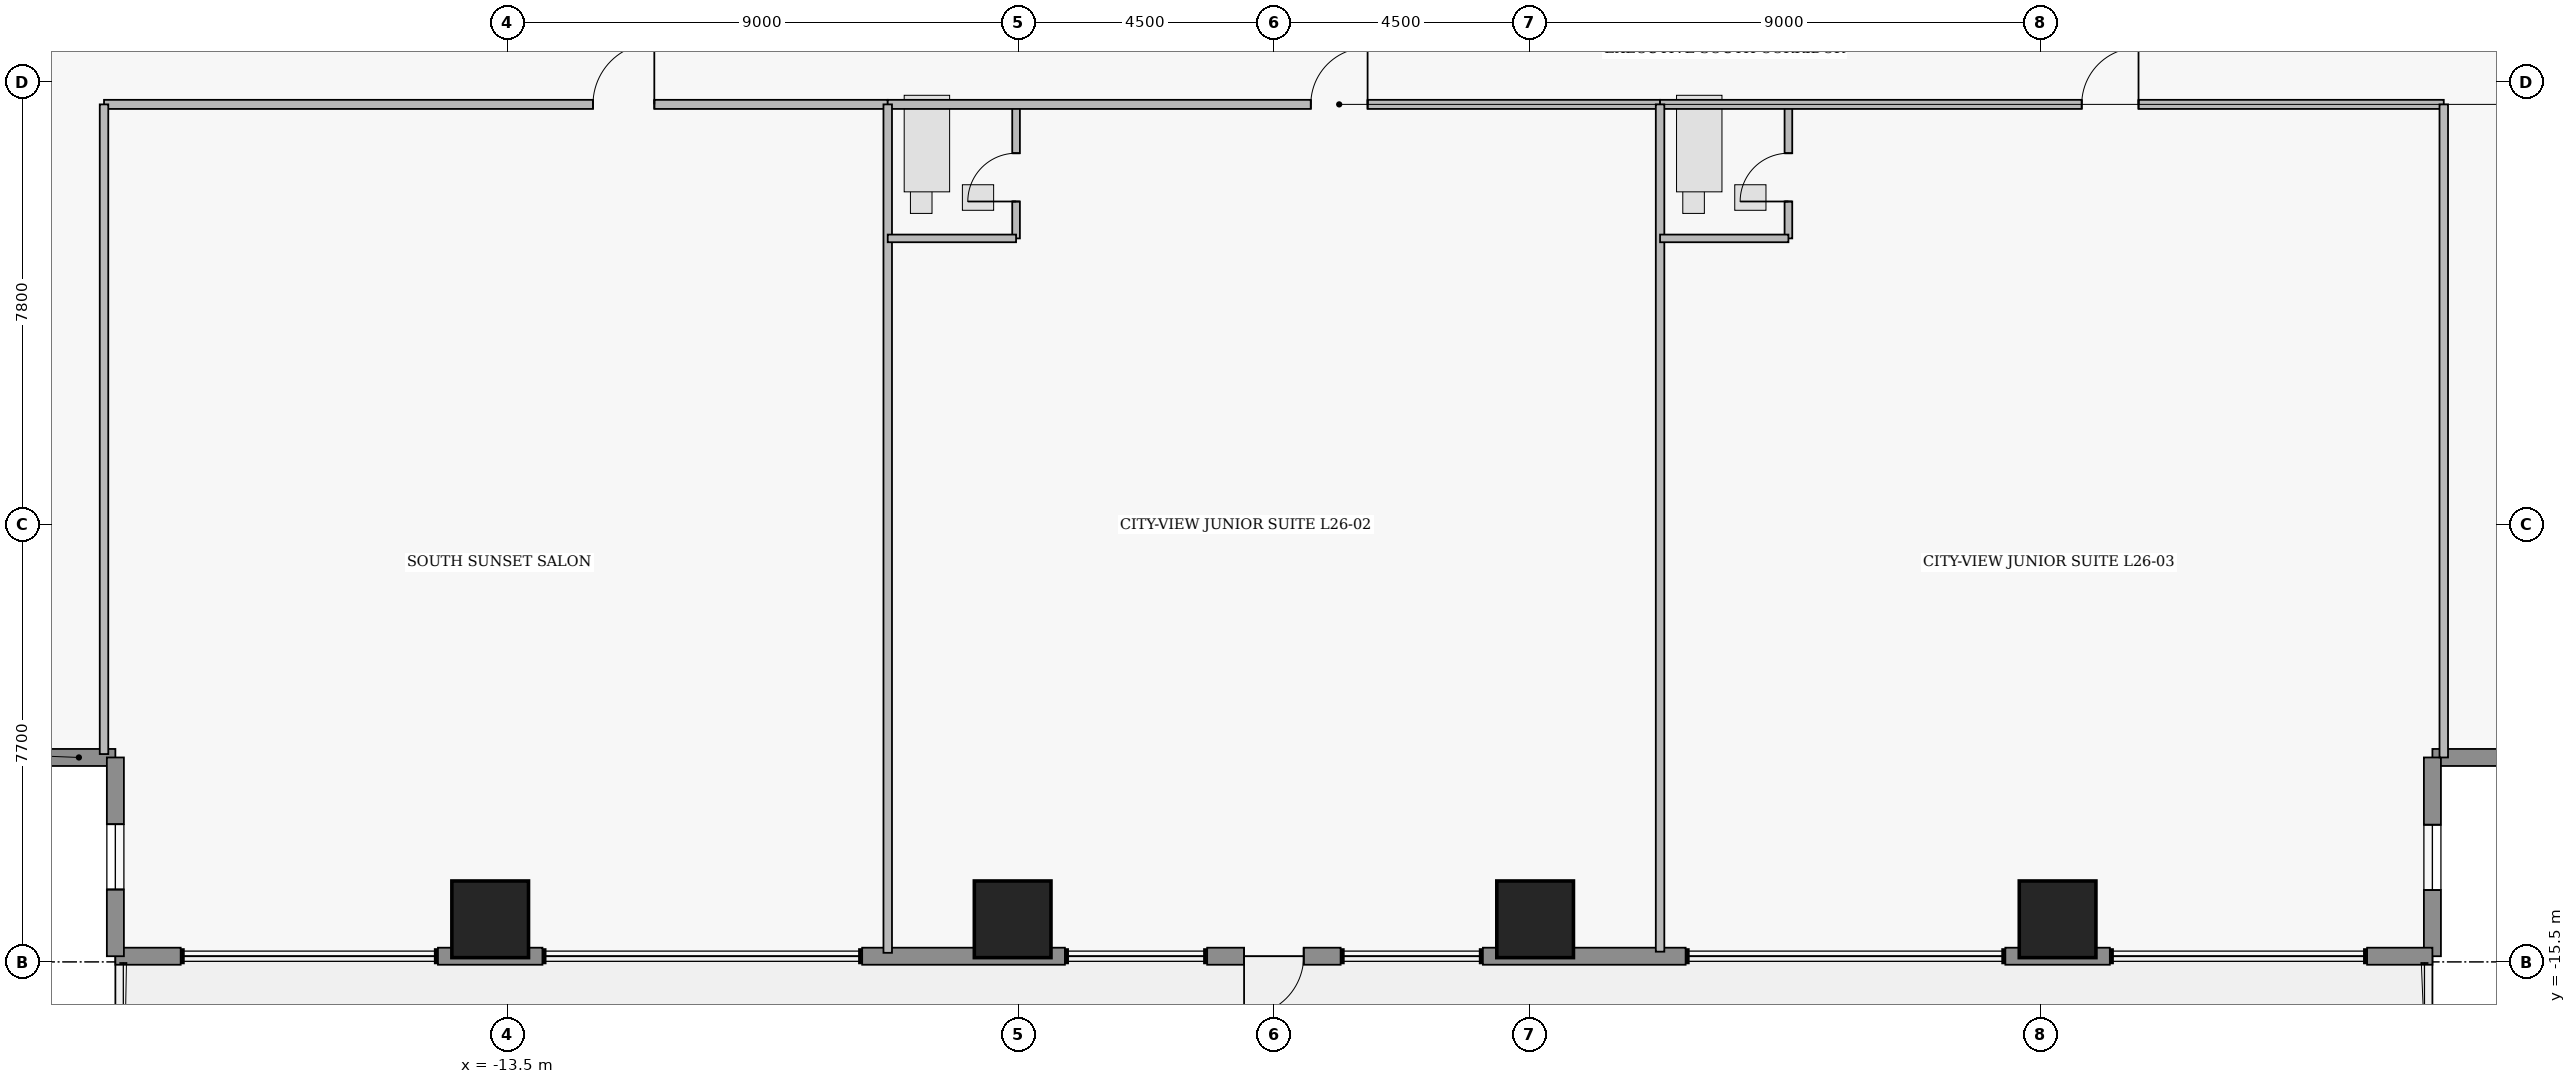
"""IFC4 building model, lengths in metres.
Left out: names, types, materials, properties, quantities, classifications, styles, units other than length and angle.
Written with IfcOpenShell. Run it as: python <this file> out.ifc"""

import sys

from ifc_helpers import new_model, si_unit, direction, frame, frame_2d, origin, origin_2d, place, context, subcontext, project, spatial, rectangle, extrude, element, fill, save


model = new_model("IFC4")
c1 = context("Model", 3, precision=1e-05, world=origin(), true_north=direction((0.0, 1.0)))
c2 = subcontext(c1, "Body", "Model", "MODEL_VIEW")
j1 = project(units=[si_unit("LENGTHUNIT", "METRE"), si_unit("PLANEANGLEUNIT", "RADIAN")], contexts=[c1])
p1 = place(None, origin())
s1 = spatial("IfcSite", under=j1, at=p1, CompositionType="ELEMENT")
p2 = place(p1, origin())
s2 = spatial("IfcBuilding", under=s1, at=p2, CompositionType="ELEMENT")
p3 = place(p2, frame((0.0, 0.0, 106.6)))
s3 = spatial("IfcBuildingStorey", under=s2, at=p3, CompositionType="ELEMENT", Elevation=106.6)
for number, where, z_axis, x_axis in (
    (1, (-13.8, -14.75, 0.0), (0.0, 0.0, 1.0), (1.0, 0.0, 0.0)),
    (2, (-4.6, -14.75, 0.0), (0.0, 0.0, 1.0), (1.0, 0.0, 0.0)),
    (3, (4.6, -14.75, 0.0), (0.0, 0.0, 1.0), (1.0, 0.0, 0.0)),
    (4, (13.8, -14.75, 0.0), (0.0, 0.0, 1.0), (1.0, 0.0, 0.0)),
):
    element("IfcColumn", number, at=place(p3, frame(where, z_axis=z_axis, x_axis=x_axis)), inside=s3, PredefinedType="COLUMN", context=c2, shape_type="SweptSolid", body=[
        extrude(rectangle(XDim=1.35, YDim=1.35, at=origin_2d()), origin(), (0.0, 0.0, 1.0), 3.65),
    ])
p4 = place(p3, frame((-20.4, -11.9, 0.0), z_axis=(0.0, 0.0, 1.0), x_axis=(-1.0, 0.0, 0.0)))
e5 = element("IfcWall", 5, at=p4, inside=s3, PredefinedType="STANDARD", context=c2, shape_type="SweptSolid", body=[
    extrude(rectangle(XDim=3.5, YDim=0.3, at=frame_2d((1.75, 0.0))), origin(), (0.0, 0.0, 1.0), 3.43),
])
p5 = place(p4, frame((1.285, 0.0, 1.25)))
e6 = element("IfcOpeningElement", 6, at=p5, cuts=e5, PredefinedType="OPENING", context=c2, shape_type="SweptSolid", body=[
    extrude(rectangle(XDim=1.15, YDim=1.55, at=frame_2d((0.575, 0.775))), frame((0.0, 0.16, 0.0), z_axis=(0.0, -1.0, 0.0), x_axis=(1.0, 0.0, 0.0)), (0.0, 0.0, 1.0), 0.32),
])
p6 = place(p3, frame((23.9, -11.9, 0.0), z_axis=(0.0, 0.0, 1.0), x_axis=(-1.0, 0.0, 0.0)))
e7 = element("IfcWall", 7, at=p6, inside=s3, PredefinedType="STANDARD", context=c2, shape_type="SweptSolid", body=[
    extrude(rectangle(XDim=3.5, YDim=0.3, at=frame_2d((1.75, 0.0))), origin(), (0.0, 0.0, 1.0), 3.43),
])
p7 = place(p6, frame((1.065, 0.0, 1.25)))
e8 = element("IfcOpeningElement", 8, at=p7, cuts=e7, PredefinedType="OPENING", context=c2, shape_type="SweptSolid", body=[
    extrude(rectangle(XDim=1.15, YDim=1.55, at=frame_2d((0.575, 0.775))), frame((0.0, 0.16, 0.0), z_axis=(0.0, -1.0, 0.0), x_axis=(1.0, 0.0, 0.0)), (0.0, 0.0, 1.0), 0.32),
])
p8 = place(p3, frame((20.4, -11.9, 0.0), z_axis=(0.0, 0.0, 1.0), x_axis=(0.0, -1.0, 0.0)))
e9 = element("IfcWall", 9, at=p8, inside=s3, PredefinedType="STANDARD", context=c2, shape_type="SweptSolid", body=[
    extrude(rectangle(XDim=3.5, YDim=0.3, at=frame_2d((1.75, 0.0))), origin(), (0.0, 0.0, 1.0), 3.43),
])
p9 = place(p8, frame((1.185, 0.0, 1.25)))
e10 = element("IfcOpeningElement", 10, at=p9, cuts=e9, PredefinedType="OPENING", context=c2, shape_type="SweptSolid", body=[
    extrude(rectangle(XDim=1.15, YDim=1.55, at=frame_2d((0.575, 0.775))), frame((0.0, 0.16, 0.0), z_axis=(0.0, -1.0, 0.0), x_axis=(1.0, 0.0, 0.0)), (0.0, 0.0, 1.0), 0.32),
])
p10 = place(p3, frame((20.4, -15.4, 0.0), z_axis=(0.0, 0.0, 1.0), x_axis=(-1.0, 0.0, 0.0)))
e11 = element("IfcWall", 11, at=p10, inside=s3, PredefinedType="STANDARD", context=c2, shape_type="SweptSolid", body=[
    extrude(rectangle(XDim=1.15, YDim=0.3, at=frame_2d((0.575, 0.0))), origin(), (0.0, 0.0, 1.0), 3.43),
])
p11 = place(p3, frame((14.72, -15.4, 0.0), z_axis=(0.0, 0.0, 1.0), x_axis=(-1.0, 0.0, 0.0)))
e12 = element("IfcWall", 12, at=p11, inside=s3, PredefinedType="STANDARD", context=c2, shape_type="SweptSolid", body=[
    extrude(rectangle(XDim=1.84, YDim=0.3, at=frame_2d((0.92, 0.0))), origin(), (0.0, 0.0, 1.0), 3.43),
])
p12 = place(p3, frame((7.25, -15.4, 0.0), z_axis=(0.0, 0.0, 1.0), x_axis=(-1.0, 0.0, 0.0)))
e13 = element("IfcWall", 13, at=p12, inside=s3, PredefinedType="STANDARD", context=c2, shape_type="SweptSolid", body=[
    extrude(rectangle(XDim=3.57, YDim=0.3, at=frame_2d((1.785, 0.0))), origin(), (0.0, 0.0, 1.0), 3.43),
])
p13 = place(p3, frame((1.175, -15.4, 0.0), z_axis=(0.0, 0.0, 1.0), x_axis=(-1.0, 0.0, 0.0)))
e14 = element("IfcWall", 14, at=p13, inside=s3, PredefinedType="STANDARD", context=c2, shape_type="SweptSolid", body=[
    extrude(rectangle(XDim=2.35, YDim=0.3, at=frame_2d((1.175, 0.0))), origin(), (0.0, 0.0, 1.0), 3.43),
])
p14 = place(p13, frame((0.65, 0.0, 0.0)))
e15 = element("IfcOpeningElement", 15, at=p14, cuts=e14, PredefinedType="OPENING", context=c2, shape_type="SweptSolid", body=[
    extrude(rectangle(XDim=1.05, YDim=2.2, at=frame_2d((0.525, 1.1))), frame((0.0, 0.16, 0.0), z_axis=(0.0, -1.0, 0.0), x_axis=(1.0, 0.0, 0.0)), (0.0, 0.0, 1.0), 0.32),
])
p15 = place(p3, frame((-3.68, -15.4, 0.0), z_axis=(0.0, 0.0, 1.0), x_axis=(-1.0, 0.0, 0.0)))
e16 = element("IfcWall", 16, at=p15, inside=s3, PredefinedType="STANDARD", context=c2, shape_type="SweptSolid", body=[
    extrude(rectangle(XDim=3.57, YDim=0.3, at=frame_2d((1.785, 0.0))), origin(), (0.0, 0.0, 1.0), 3.43),
])
p16 = place(p3, frame((-12.88, -15.4, 0.0), z_axis=(0.0, 0.0, 1.0), x_axis=(-1.0, 0.0, 0.0)))
e17 = element("IfcWall", 17, at=p16, inside=s3, PredefinedType="STANDARD", context=c2, shape_type="SweptSolid", body=[
    extrude(rectangle(XDim=1.84, YDim=0.3, at=frame_2d((0.92, 0.0))), origin(), (0.0, 0.0, 1.0), 3.43),
])
p17 = place(p3, frame((-19.25, -15.4, 0.0), z_axis=(0.0, 0.0, 1.0), x_axis=(-1.0, 0.0, 0.0)))
e18 = element("IfcWall", 18, at=p17, inside=s3, PredefinedType="STANDARD", context=c2, shape_type="SweptSolid", body=[
    extrude(rectangle(XDim=1.15, YDim=0.3, at=frame_2d((0.575, 0.0))), origin(), (0.0, 0.0, 1.0), 3.43),
])
p18 = place(p3, frame((-20.4, -15.4, 0.0), z_axis=(0.0, 0.0, 1.0), x_axis=(0.0, 1.0, 0.0)))
e19 = element("IfcWall", 19, at=p18, inside=s3, PredefinedType="STANDARD", context=c2, shape_type="SweptSolid", body=[
    extrude(rectangle(XDim=3.5, YDim=0.3, at=frame_2d((1.75, 0.0))), origin(), (0.0, 0.0, 1.0), 3.43),
])
p19 = place(p18, frame((1.175, 0.0, 1.25)))
e20 = element("IfcOpeningElement", 20, at=p19, cuts=e19, PredefinedType="OPENING", context=c2, shape_type="SweptSolid", body=[
    extrude(rectangle(XDim=1.15, YDim=1.55, at=frame_2d((0.575, 0.775))), frame((0.0, 0.16, 0.0), z_axis=(0.0, -1.0, 0.0), x_axis=(1.0, 0.0, 0.0)), (0.0, 0.0, 1.0), 0.32),
])
p20 = place(p3, frame((-20.6, -0.4, 0.0), z_axis=(0.0, 0.0, 1.0), x_axis=(1.0, 0.0, 0.0)))
e21 = element("IfcWall", 21, at=p20, inside=s3, PredefinedType="PARTITIONING", context=c2, shape_type="SweptSolid", body=[
    extrude(rectangle(XDim=13.8, YDim=0.16, at=frame_2d((6.9, 0.0))), origin(), (0.0, 0.0, 1.0), 3.43),
])
p21 = place(p20, frame((8.61, 0.0, 0.0)))
e22 = element("IfcOpeningElement", 22, at=p21, cuts=e21, PredefinedType="OPENING", context=c2, shape_type="SweptSolid", body=[
    extrude(rectangle(XDim=1.08, YDim=2.18, at=frame_2d((0.54, 1.09))), frame((0.0, 0.09, 0.0), z_axis=(0.0, -1.0, 0.0), x_axis=(1.0, 0.0, 0.0)), (0.0, 0.0, 1.0), 0.18),
])
p22 = place(p3, frame((-4.54, -2.76, 0.0), z_axis=(0.0, 0.0, 1.0), x_axis=(0.0, 1.0, 0.0)))
e23 = element("IfcWall", 23, at=p22, inside=s3, PredefinedType="PLUMBINGWALL", context=c2, shape_type="SweptSolid", body=[
    extrude(rectangle(XDim=2.36, YDim=0.135, at=frame_2d((1.18, 0.0))), origin(), (0.0, 0.0, 1.0), 2.747),
])
p23 = place(p22, frame((0.65, 0.0, 0.0)))
e24 = element("IfcOpeningElement", 24, at=p23, cuts=e23, PredefinedType="OPENING", context=c2, shape_type="SweptSolid", body=[
    extrude(rectangle(XDim=0.85, YDim=2.1, at=frame_2d((0.425, 1.05))), frame((0.0, 0.077, 0.0), z_axis=(0.0, -1.0, 0.0), x_axis=(1.0, 0.0, 0.0)), (0.0, 0.0, 1.0), 0.155),
])
p24 = place(p3, frame((-6.8, -0.4, 0.0), z_axis=(0.0, 0.0, 1.0), x_axis=(1.0, 0.0, 0.0)))
e25 = element("IfcWall", 25, at=p24, inside=s3, PredefinedType="PARTITIONING", context=c2, shape_type="SweptSolid", body=[
    extrude(rectangle(XDim=13.6, YDim=0.16, at=frame_2d((6.8, 0.0))), origin(), (0.0, 0.0, 1.0), 3.43),
])
p25 = place(p24, frame((7.45, 0.0, 0.0)))
e26 = element("IfcOpeningElement", 26, at=p25, cuts=e25, PredefinedType="OPENING", context=c2, shape_type="SweptSolid", body=[
    extrude(rectangle(XDim=1.0, YDim=2.15, at=frame_2d((0.5, 1.075))), frame((0.0, 0.09, 0.0), z_axis=(0.0, -1.0, 0.0), x_axis=(1.0, 0.0, 0.0)), (0.0, 0.0, 1.0), 0.18),
])
p26 = place(p3, frame((9.06, -2.76, 0.0), z_axis=(0.0, 0.0, 1.0), x_axis=(0.0, 1.0, 0.0)))
e27 = element("IfcWall", 27, at=p26, inside=s3, PredefinedType="PLUMBINGWALL", context=c2, shape_type="SweptSolid", body=[
    extrude(rectangle(XDim=2.36, YDim=0.135, at=frame_2d((1.18, 0.0))), origin(), (0.0, 0.0, 1.0), 3.43),
])
p27 = place(p26, frame((0.65, 0.0, 0.0)))
e28 = element("IfcOpeningElement", 28, at=p27, cuts=e27, PredefinedType="OPENING", context=c2, shape_type="SweptSolid", body=[
    extrude(rectangle(XDim=0.85, YDim=2.1, at=frame_2d((0.425, 1.05))), frame((0.0, 0.077, 0.0), z_axis=(0.0, -1.0, 0.0), x_axis=(1.0, 0.0, 0.0)), (0.0, 0.0, 1.0), 0.155),
])
p28 = place(p3, frame((6.8, -0.4, 0.0), z_axis=(0.0, 0.0, 1.0), x_axis=(1.0, 0.0, 0.0)))
e29 = element("IfcWall", 29, at=p28, inside=s3, PredefinedType="PARTITIONING", context=c2, shape_type="SweptSolid", body=[
    extrude(rectangle(XDim=13.8, YDim=0.16, at=frame_2d((6.9, 0.0))), origin(), (0.0, 0.0, 1.0), 3.43),
])
p29 = place(p28, frame((7.425, 0.0, 0.0)))
e30 = element("IfcOpeningElement", 30, at=p29, cuts=e29, PredefinedType="OPENING", context=c2, shape_type="SweptSolid", body=[
    extrude(rectangle(XDim=1.0, YDim=2.15, at=frame_2d((0.5, 1.075))), frame((0.0, 0.09, 0.0), z_axis=(0.0, -1.0, 0.0), x_axis=(1.0, 0.0, 0.0)), (0.0, 0.0, 1.0), 0.18),
])
p30 = place(p3, frame((-20.6, -11.84, 0.0), z_axis=(0.0, 0.0, 1.0), x_axis=(0.0, 1.0, 0.0)))
e31 = element("IfcWall", 31, at=p30, inside=s3, PredefinedType="PARTITIONING", context=c2, shape_type="SweptSolid", body=[
    extrude(rectangle(XDim=11.44, YDim=0.15, at=frame_2d((5.72, 0.0))), origin(), (0.0, 0.0, 1.0), 3.43),
])
p31 = place(p3, frame((-6.8, -15.34, 0.0), z_axis=(0.0, 0.0, 1.0), x_axis=(0.0, 1.0, 0.0)))
e32 = element("IfcWall", 32, at=p31, inside=s3, PredefinedType="PARTITIONING", context=c2, shape_type="SweptSolid", body=[
    extrude(rectangle(XDim=14.94, YDim=0.15, at=frame_2d((7.47, 0.0))), origin(), (0.0, 0.0, 1.0), 3.43),
])
p32 = place(p3, frame((-6.8, -2.76, 0.0), z_axis=(0.0, 0.0, 1.0), x_axis=(1.0, 0.0, 0.0)))
e33 = element("IfcWall", 33, at=p32, inside=s3, PredefinedType="PLUMBINGWALL", context=c2, shape_type="SweptSolid", body=[
    extrude(rectangle(XDim=2.26, YDim=0.135, at=frame_2d((1.13, 0.0))), origin(), (0.0, 0.0, 1.0), 3.43),
])
p33 = place(p3, frame((6.8, -15.32, 0.0), z_axis=(0.0, 0.0, 1.0), x_axis=(0.0, 1.0, 0.0)))
e34 = element("IfcWall", 34, at=p33, inside=s3, PredefinedType="PARTITIONING", context=c2, shape_type="SweptSolid", body=[
    extrude(rectangle(XDim=14.92, YDim=0.15, at=frame_2d((7.46, 0.0))), origin(), (0.0, 0.0, 1.0), 3.43),
])
p34 = place(p3, frame((6.8, -2.76, 0.0), z_axis=(0.0, 0.0, 1.0), x_axis=(1.0, 0.0, 0.0)))
e35 = element("IfcWall", 35, at=p34, inside=s3, PredefinedType="PLUMBINGWALL", context=c2, shape_type="SweptSolid", body=[
    extrude(rectangle(XDim=2.26, YDim=0.135, at=frame_2d((1.13, 0.0))), origin(), (0.0, 0.0, 1.0), 3.43),
])
p35 = place(p3, frame((20.6, -11.9, 0.0), z_axis=(0.0, 0.0, 1.0), x_axis=(0.0, 1.0, 0.0)))
e36 = element("IfcWall", 36, at=p35, inside=s3, PredefinedType="PARTITIONING", context=c2, shape_type="SweptSolid", body=[
    extrude(rectangle(XDim=11.5, YDim=0.15, at=frame_2d((5.75, 0.0))), origin(), (0.0, 0.0, 1.0), 3.43),
])
p36 = place(p9, origin())
e37 = element("IfcWindow", 37, at=p36, inside=s3, PartitioningType="SINGLE_PANEL", PredefinedType="WINDOW", context=c2, shape_type="SweptSolid", body=[
    extrude(rectangle(XDim=1.15, YDim=1.55, at=frame_2d((0.575, 0.775))), frame((0.0, 0.03, 0.0), z_axis=(0.0, -1.0, 0.0), x_axis=(1.0, 0.0, 0.0)), (0.0, 0.0, 1.0), 0.06),
])
fill(e10, e37)
p37 = place(p14, origin())
e38 = element("IfcDoor", 38, at=p37, inside=s3, OperationType="SINGLE_SWING_RIGHT", PredefinedType="DOOR", context=c2, shape_type="SweptSolid", body=[
    extrude(rectangle(XDim=1.05, YDim=2.2, at=frame_2d((0.525, 1.1))), frame((0.0, 0.025, 0.0), z_axis=(0.0, -1.0, 0.0), x_axis=(1.0, 0.0, 0.0)), (0.0, 0.0, 1.0), 0.05),
])
fill(e15, e38)
p38 = place(p19, origin())
e39 = element("IfcWindow", 39, at=p38, inside=s3, PartitioningType="SINGLE_PANEL", PredefinedType="WINDOW", context=c2, shape_type="SweptSolid", body=[
    extrude(rectangle(XDim=1.15, YDim=1.55, at=frame_2d((0.575, 0.775))), frame((0.0, 0.03, 0.0), z_axis=(0.0, -1.0, 0.0), x_axis=(1.0, 0.0, 0.0)), (0.0, 0.0, 1.0), 0.06),
])
fill(e20, e39)
p39 = place(p21, origin())
e40 = element("IfcDoor", 40, at=p39, inside=s3, OperationType="SINGLE_SWING_RIGHT", PredefinedType="DOOR", context=c2, shape_type="SweptSolid", body=[
    extrude(rectangle(XDim=1.08, YDim=2.18, at=frame_2d((0.54, 1.09))), frame((0.0, 0.025, 0.0), z_axis=(0.0, -1.0, 0.0), x_axis=(1.0, 0.0, 0.0)), (0.0, 0.0, 1.0), 0.05),
])
fill(e22, e40)
p40 = place(p23, origin())
e41 = element("IfcDoor", 41, at=p40, inside=s3, OperationType="SINGLE_SWING_LEFT", PredefinedType="DOOR", context=c2, shape_type="SweptSolid", body=[
    extrude(rectangle(XDim=0.85, YDim=2.1, at=frame_2d((0.425, 1.05))), frame((0.0, 0.025, 0.0), z_axis=(0.0, -1.0, 0.0), x_axis=(1.0, 0.0, 0.0)), (0.0, 0.0, 1.0), 0.05),
])
fill(e24, e41)
p41 = place(p25, origin())
e42 = element("IfcDoor", 42, at=p41, inside=s3, OperationType="SINGLE_SWING_RIGHT", PredefinedType="DOOR", context=c2, shape_type="SweptSolid", body=[
    extrude(rectangle(XDim=1.0, YDim=2.15, at=frame_2d((0.5, 1.075))), frame((0.0, 0.025, 0.0), z_axis=(0.0, -1.0, 0.0), x_axis=(1.0, 0.0, 0.0)), (0.0, 0.0, 1.0), 0.05),
])
fill(e26, e42)
p42 = place(p27, origin())
e43 = element("IfcDoor", 43, at=p42, inside=s3, OperationType="SINGLE_SWING_LEFT", PredefinedType="DOOR", context=c2, shape_type="SweptSolid", body=[
    extrude(rectangle(XDim=0.85, YDim=2.1, at=frame_2d((0.425, 1.05))), frame((0.0, 0.025, 0.0), z_axis=(0.0, -1.0, 0.0), x_axis=(1.0, 0.0, 0.0)), (0.0, 0.0, 1.0), 0.05),
])
fill(e28, e43)
p43 = place(p29, origin())
e44 = element("IfcDoor", 44, at=p43, inside=s3, OperationType="SINGLE_SWING_RIGHT", PredefinedType="DOOR", context=c2, shape_type="SweptSolid", body=[
    extrude(rectangle(XDim=1.0, YDim=2.15, at=frame_2d((0.5, 1.075))), frame((0.0, 0.025, 0.0), z_axis=(0.0, -1.0, 0.0), x_axis=(1.0, 0.0, 0.0)), (0.0, 0.0, 1.0), 0.05),
])
fill(e30, e44)
save(model, sys.argv[1])
